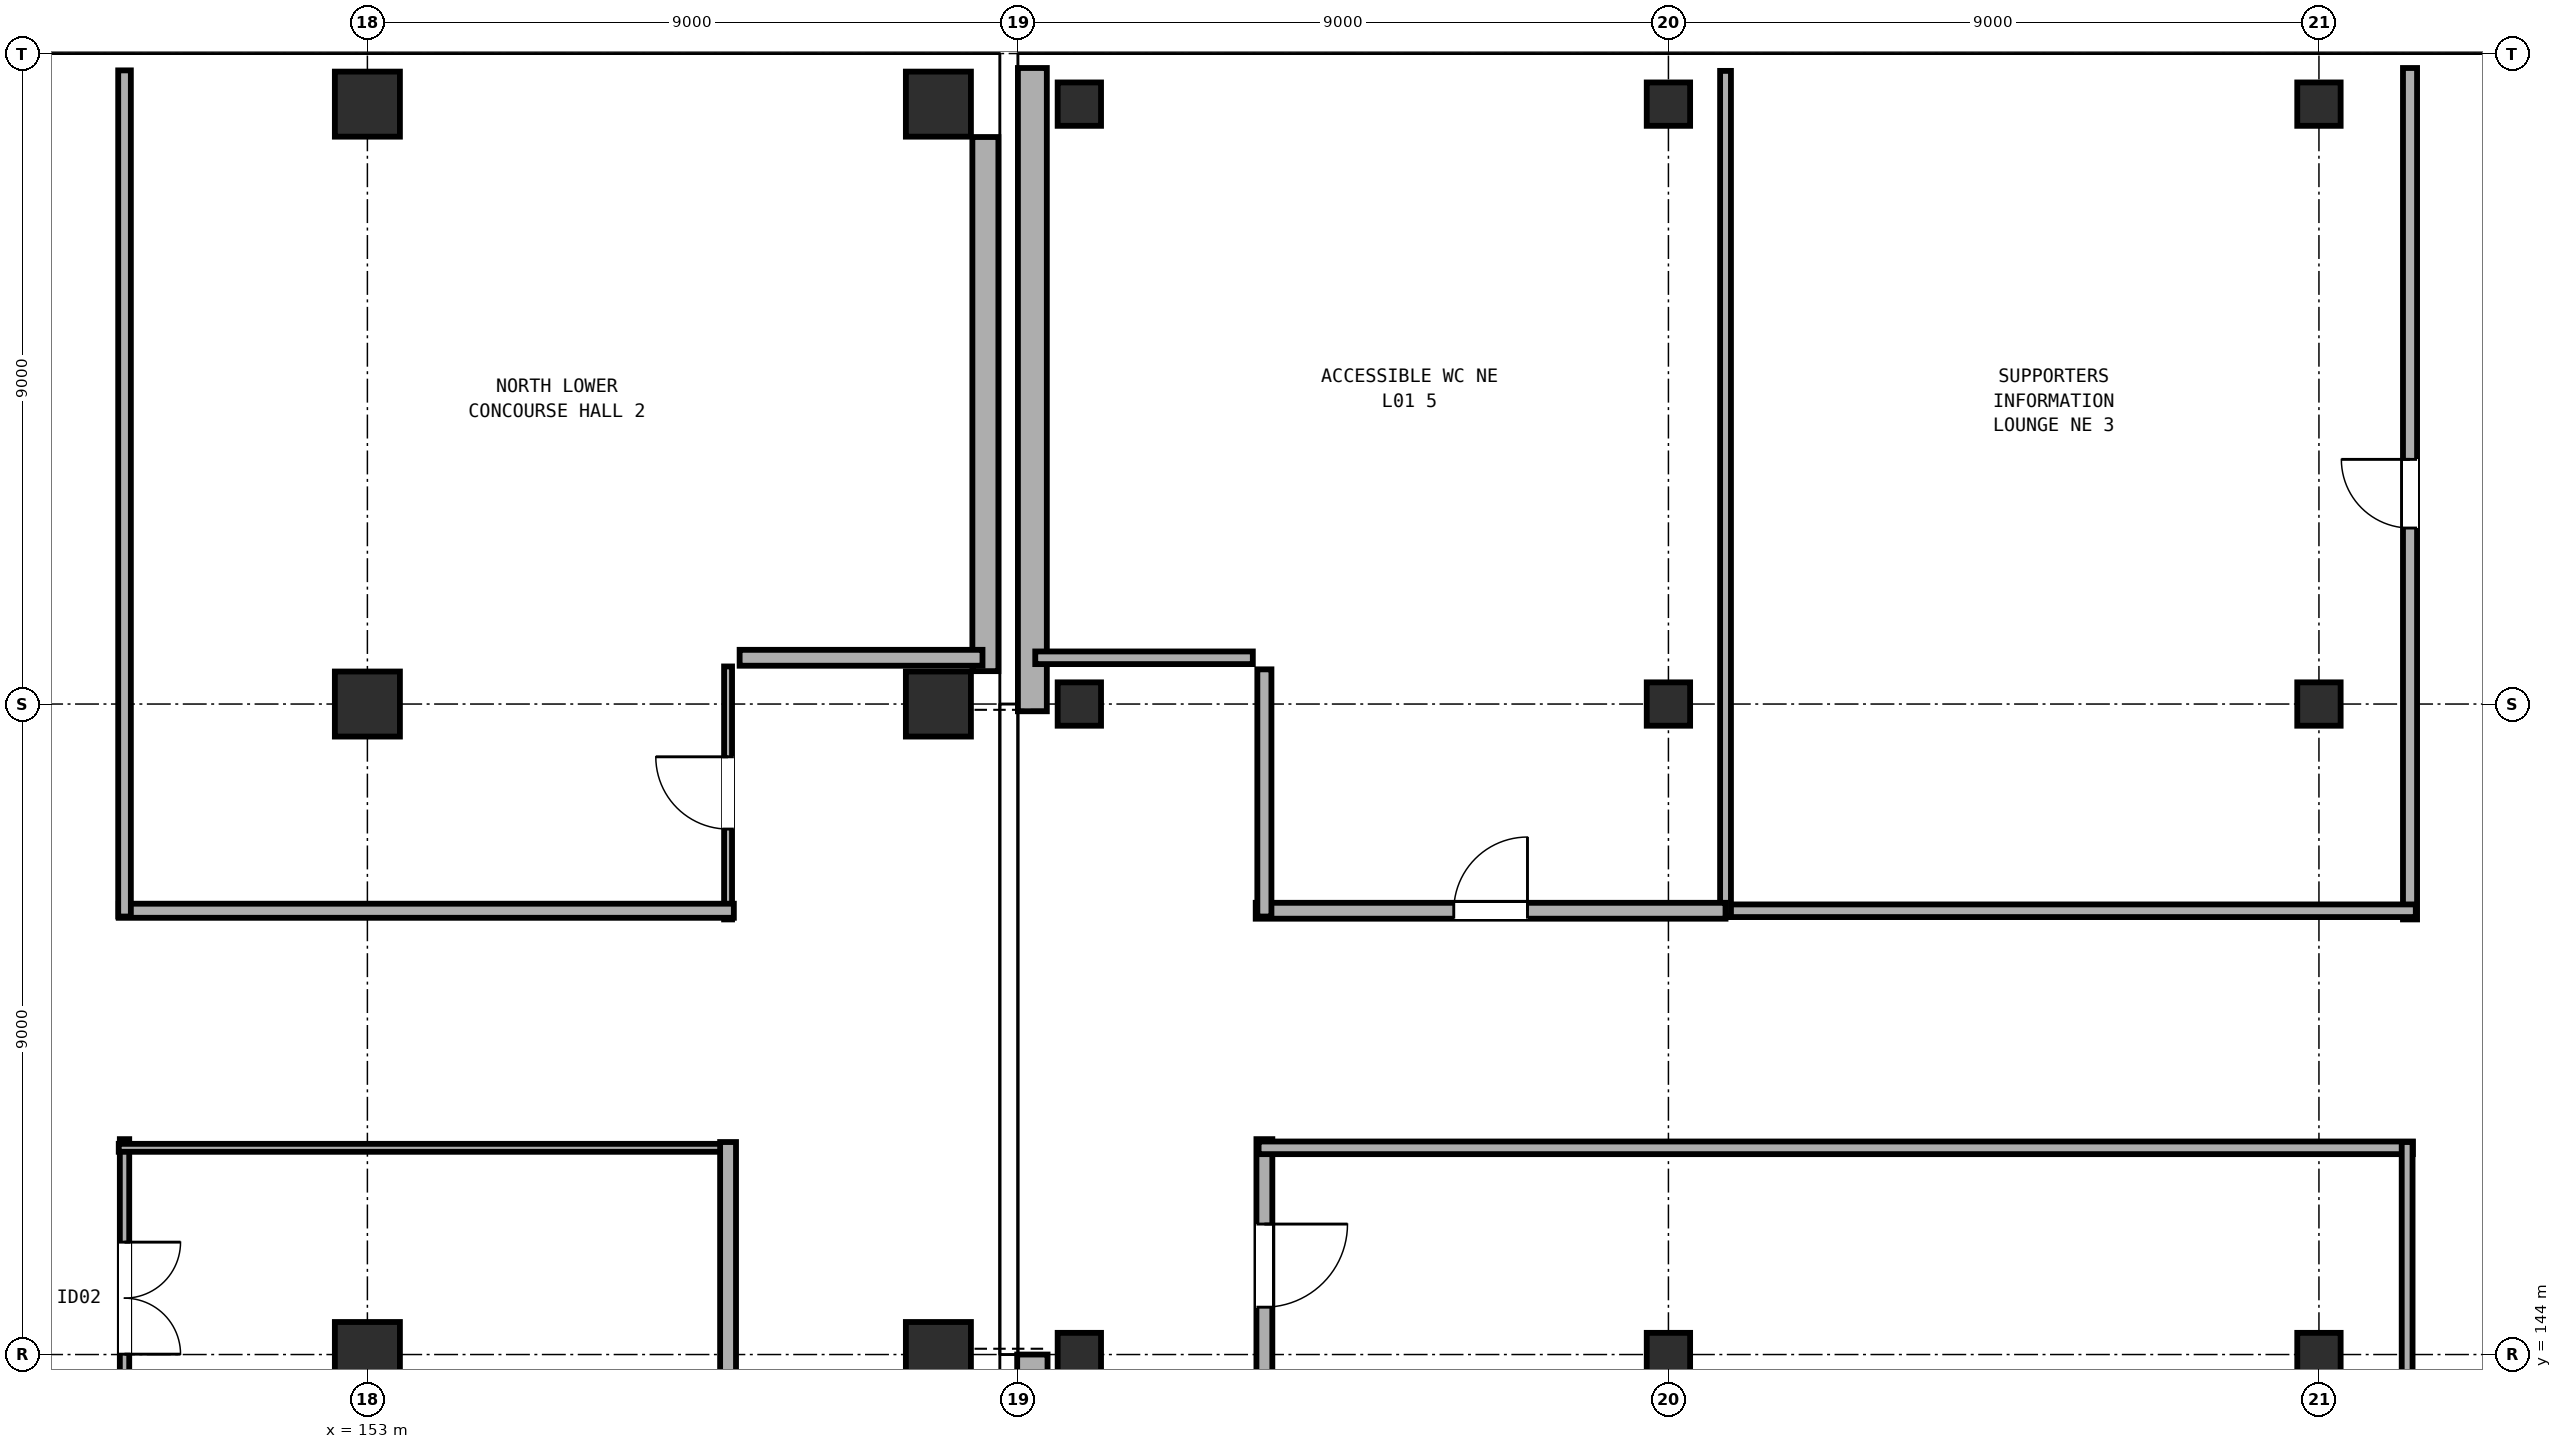
"""IFC4 building model, lengths in metres.
Left out: names, types, materials, properties, quantities, classifications, styles, units other than length and angle.
Written with IfcOpenShell. Run it as: python <this file> out.ifc"""

import sys

from ifc_helpers import new_model, si_unit, direction, frame, frame_2d, origin, origin_2d, place, context, subcontext, project, spatial, rectangle, extrude, element, fill, save


model = new_model("IFC4")
c1 = context("Model", 3, precision=1e-05, world=origin(), true_north=direction((0.0, 1.0)))
c2 = subcontext(c1, "Body", "Model", "MODEL_VIEW")
j1 = project(units=[si_unit("LENGTHUNIT", "METRE"), si_unit("PLANEANGLEUNIT", "RADIAN")], contexts=[c1])
p1 = place(None, origin())
s1 = spatial("IfcSite", under=j1, at=p1, CompositionType="ELEMENT")
p2 = place(p1, origin())
s2 = spatial("IfcBuilding", under=s1, at=p2, CompositionType="ELEMENT")
p3 = place(p2, frame((0.0, 0.0, 4.8)))
s3 = spatial("IfcBuildingStorey", under=s2, at=p3, CompositionType="ELEMENT", Elevation=4.8)
for number, where, z_axis, x_axis in (
    (1, (153.0, 144.0, 0.0), (0.0, 0.0, 1.0), (1.0, 0.0, 0.0)),
    (2, (153.0, 153.0, 0.0), (0.0, 0.0, 1.0), (1.0, 0.0, 0.0)),
    (3, (153.0, 161.3, 0.0), (0.0, 0.0, 1.0), (1.0, 0.0, 0.0)),
    (4, (160.9, 144.0, 0.0), (0.0, 0.0, 1.0), (1.0, 0.0, 0.0)),
    (5, (160.9, 153.0, 0.0), (0.0, 0.0, 1.0), (1.0, 0.0, 0.0)),
    (6, (160.9, 161.3, 0.0), (0.0, 0.0, 1.0), (1.0, 0.0, 0.0)),
):
    element("IfcColumn", number, at=place(p3, frame(where, z_axis=z_axis, x_axis=x_axis)), inside=s3, PredefinedType="COLUMN", context=c2, shape_type="SweptSolid", body=[
        extrude(rectangle(XDim=0.9, YDim=0.9, at=origin_2d()), origin(), (0.0, 0.0, 1.0), 4.8),
    ])
for number, where, z_axis, x_axis in (
    (7, (162.85, 144.0, 0.0), (0.0, 0.0, 1.0), (1.0, 0.0, 0.0)),
    (8, (162.85, 153.0, 0.0), (0.0, 0.0, 1.0), (1.0, 0.0, 0.0)),
    (9, (162.85, 161.3, 0.0), (0.0, 0.0, 1.0), (1.0, 0.0, 0.0)),
    (10, (171.0, 144.0, 0.0), (0.0, 0.0, 1.0), (1.0, 0.0, 0.0)),
    (11, (171.0, 153.0, 0.0), (0.0, 0.0, 1.0), (1.0, 0.0, 0.0)),
    (12, (171.0, 161.3, 0.0), (0.0, 0.0, 1.0), (1.0, 0.0, 0.0)),
    (13, (180.0, 144.0, 0.0), (0.0, 0.0, 1.0), (1.0, 0.0, 0.0)),
    (14, (180.0, 153.0, 0.0), (0.0, 0.0, 1.0), (1.0, 0.0, 0.0)),
    (15, (180.0, 161.3, 0.0), (0.0, 0.0, 1.0), (1.0, 0.0, 0.0)),
):
    element("IfcColumn", number, at=place(p3, frame(where, z_axis=z_axis, x_axis=x_axis)), inside=s3, PredefinedType="COLUMN", context=c2, shape_type="SweptSolid", body=[
        extrude(rectangle(XDim=0.6, YDim=0.6, at=origin_2d()), origin(), (0.0, 0.0, 1.0), 4.8),
    ])
p4 = place(p3, frame((161.55, 160.845, 0.0), z_axis=(0.0, 0.0, 1.0), x_axis=(0.0, -1.0, 0.0)))
e16 = element("IfcWall", 16, at=p4, inside=s3, PredefinedType="SOLIDWALL", context=c2, shape_type="SweptSolid", body=[
    extrude(rectangle(XDim=7.39, YDim=0.36, at=frame_2d((3.695, 0.0))), origin(), (0.0, 0.0, 1.0), 3.28),
])
p5 = place(p3, frame((162.2, 135.1, 0.0), z_axis=(0.0, 0.0, 1.0), x_axis=(0.0, 1.0, 0.0)))
e17 = element("IfcWall", 17, at=p5, inside=s3, PredefinedType="SOLIDWALL", context=c2, shape_type="SweptSolid", body=[
    extrude(rectangle(XDim=8.9, YDim=0.42, at=frame_2d((4.45, 0.0))), origin(), (0.0, 0.0, 1.0), 3.28),
])
p6 = place(p3, frame((162.2, 152.9, 0.0), z_axis=(0.0, 0.0, 1.0), x_axis=(0.0, 1.0, 0.0)))
e18 = element("IfcWall", 18, at=p6, inside=s3, PredefinedType="SOLIDWALL", context=c2, shape_type="SweptSolid", body=[
    extrude(rectangle(XDim=8.9, YDim=0.4, at=frame_2d((4.45, 0.0))), origin(), (0.0, 0.0, 1.0), 3.28),
])
p7 = place(p3, frame((163.155, 161.8, 0.0), z_axis=(0.0, 0.0, 1.0), x_axis=(1.0, 0.0, 0.0)))
e19 = element("IfcWall", 19, at=p7, inside=s3, PredefinedType="SOLIDWALL", context=c2, shape_type="SweptSolid", body=[
    extrude(rectangle(XDim=7.54, YDim=0.38, at=frame_2d((3.77, 0.0))), origin(), (0.0, 0.0, 1.0), 3.28),
])
p8 = place(p3, frame((171.305, 161.8, 0.0), z_axis=(0.0, 0.0, 1.0), x_axis=(1.0, 0.0, 0.0)))
e20 = element("IfcWall", 20, at=p8, inside=s3, PredefinedType="SOLIDWALL", context=c2, shape_type="SweptSolid", body=[
    extrude(rectangle(XDim=8.39, YDim=0.36, at=frame_2d((4.195, 0.0))), origin(), (0.0, 0.0, 1.0), 3.28),
])
p9 = place(p3, frame((180.305, 161.8, 0.0), z_axis=(0.0, 0.0, 1.0), x_axis=(1.0, 0.0, 0.0)))
e21 = element("IfcWall", 21, at=p9, inside=s3, PredefinedType="SOLIDWALL", context=c2, shape_type="SweptSolid", body=[
    extrude(rectangle(XDim=8.39, YDim=0.34, at=frame_2d((4.195, 0.0))), origin(), (0.0, 0.0, 1.0), 3.58),
])
p10 = place(p9, frame((1.552, 0.0, 0.9)))
e22 = element("IfcOpeningElement", 22, at=p10, cuts=e21, PredefinedType="OPENING", context=c2, shape_type="SweptSolid", body=[
    extrude(rectangle(XDim=2.5, YDim=2.1, at=frame_2d((1.25, 1.05))), frame((0.0, 0.18, 0.0), z_axis=(0.0, -1.0, 0.0), x_axis=(1.0, 0.0, 0.0)), (0.0, 0.0, 1.0), 0.36),
])
p11 = place(p3, frame((149.64, 146.98, 0.0), z_axis=(0.0, 0.0, 1.0), x_axis=(0.0, -1.0, 0.0)))
e23 = element("IfcWall", 23, at=p11, inside=s3, PredefinedType="PARTITIONING", context=c2, shape_type="SweptSolid", body=[
    extrude(rectangle(XDim=4.453, YDim=0.13, at=frame_2d((2.227, 0.0))), origin(), (0.0, 0.0, 1.0), 3.28),
])
p12 = place(p11, frame((1.425, 0.0, 0.0)))
e24 = element("IfcOpeningElement", 24, at=p12, cuts=e23, PredefinedType="OPENING", context=c2, shape_type="SweptSolid", body=[
    extrude(rectangle(XDim=1.55, YDim=2.2, at=frame_2d((0.775, 1.1))), frame((0.0, 0.075, 0.0), z_axis=(0.0, -1.0, 0.0), x_axis=(1.0, 0.0, 0.0)), (0.0, 0.0, 1.0), 0.15),
])
p13 = place(p3, frame((149.56, 146.86, 0.0), z_axis=(0.0, 0.0, 1.0), x_axis=(1.0, 0.0, 0.0)))
e25 = element("IfcWall", 25, at=p13, inside=s3, PredefinedType="PARTITIONING", context=c2, shape_type="SweptSolid", body=[
    extrude(rectangle(XDim=8.51, YDim=0.11, at=frame_2d((4.255, 0.0))), origin(), (0.0, 0.0, 1.0), 3.28),
])
p14 = place(p3, frame((157.99, 146.94, 0.0), z_axis=(0.0, 0.0, 1.0), x_axis=(0.0, -1.0, 0.0)))
e26 = element("IfcWall", 26, at=p14, inside=s3, PredefinedType="PARTITIONING", context=c2, shape_type="SweptSolid", body=[
    extrude(rectangle(XDim=3.42, YDim=0.22, at=frame_2d((1.71, 0.0))), origin(), (0.0, 0.0, 1.0), 3.28),
])
p15 = place(p3, frame((157.99, 150.02, 0.0), z_axis=(0.0, 0.0, 1.0), x_axis=(0.0, 1.0, 0.0)))
e27 = element("IfcWall", 27, at=p15, inside=s3, PredefinedType="PARTITIONING", context=c2, shape_type="SweptSolid", body=[
    extrude(rectangle(XDim=3.5, YDim=0.11, at=frame_2d((1.75, 0.0))), origin(), (0.0, 0.0, 1.0), 3.28),
])
p16 = place(p15, frame((1.25, 0.0, 0.0)))
e28 = element("IfcOpeningElement", 28, at=p16, cuts=e27, PredefinedType="OPENING", context=c2, shape_type="SweptSolid", body=[
    extrude(rectangle(XDim=1.0, YDim=2.1, at=frame_2d((0.5, 1.05))), frame((0.0, 0.065, 0.0), z_axis=(0.0, -1.0, 0.0), x_axis=(1.0, 0.0, 0.0)), (0.0, 0.0, 1.0), 0.13),
])
p17 = place(p3, frame((161.51, 153.64, 0.0), z_axis=(0.0, 0.0, 1.0), x_axis=(-1.0, 0.0, 0.0)))
e29 = element("IfcWall", 29, at=p17, inside=s3, PredefinedType="PARTITIONING", context=c2, shape_type="SweptSolid", body=[
    extrude(rectangle(XDim=3.36, YDim=0.22, at=frame_2d((1.68, 0.0))), origin(), (0.0, 0.0, 1.0), 3.28),
])
p18 = place(p3, frame((158.07, 150.14, 0.0), z_axis=(0.0, 0.0, 1.0), x_axis=(-1.0, 0.0, 0.0)))
e30 = element("IfcWall", 30, at=p18, inside=s3, PredefinedType="PARTITIONING", context=c2, shape_type="SweptSolid", body=[
    extrude(rectangle(XDim=8.51, YDim=0.195, at=frame_2d((4.255, 0.0))), origin(), (0.0, 0.0, 1.0), 3.28),
])
p19 = place(p3, frame((149.64, 150.06, 0.0), z_axis=(0.0, 0.0, 1.0), x_axis=(0.0, 1.0, 0.0)))
e31 = element("IfcWall", 31, at=p19, inside=s3, PredefinedType="PARTITIONING", context=c2, shape_type="SweptSolid", body=[
    extrude(rectangle(XDim=11.707, YDim=0.175, at=frame_2d((5.854, 0.0))), origin(), (0.0, 0.0, 1.0), 3.28),
])
p20 = place(p3, frame((165.41, 146.98, 0.0), z_axis=(0.0, 0.0, 1.0), x_axis=(0.0, -1.0, 0.0)))
e32 = element("IfcWall", 32, at=p20, inside=s3, PredefinedType="PARTITIONING", context=c2, shape_type="SweptSolid", body=[
    extrude(rectangle(XDim=3.5, YDim=0.22, at=frame_2d((1.75, 0.0))), origin(), (0.0, 0.0, 1.0), 3.28),
])
p21 = place(p20, frame((1.175, 0.0, 0.0)))
e33 = element("IfcOpeningElement", 33, at=p21, cuts=e32, PredefinedType="OPENING", context=c2, shape_type="SweptSolid", body=[
    extrude(rectangle(XDim=1.15, YDim=2.15, at=frame_2d((0.575, 1.075))), frame((0.0, 0.12, 0.0), z_axis=(0.0, -1.0, 0.0), x_axis=(1.0, 0.0, 0.0)), (0.0, 0.0, 1.0), 0.24),
])
p22 = place(p3, frame((165.33, 146.86, 0.0), z_axis=(0.0, 0.0, 1.0), x_axis=(1.0, 0.0, 0.0)))
e34 = element("IfcWall", 34, at=p22, inside=s3, PredefinedType="PARTITIONING", context=c2, shape_type="SweptSolid", body=[
    extrude(rectangle(XDim=15.97, YDim=0.175, at=frame_2d((7.985, 0.0))), origin(), (0.0, 0.0, 1.0), 3.28),
])
p23 = place(p3, frame((181.22, 146.94, 0.0), z_axis=(0.0, 0.0, 1.0), x_axis=(0.0, -1.0, 0.0)))
e35 = element("IfcWall", 35, at=p23, inside=s3, PredefinedType="PARTITIONING", context=c2, shape_type="SweptSolid", body=[
    extrude(rectangle(XDim=4.413, YDim=0.15, at=frame_2d((2.207, 0.0))), origin(), (0.0, 0.0, 1.0), 3.28),
])
p24 = place(p3, frame((181.26, 150.02, 0.0), z_axis=(0.0, 0.0, 1.0), x_axis=(0.0, 1.0, 0.0)))
e36 = element("IfcWall", 36, at=p24, inside=s3, PredefinedType="PARTITIONING", context=c2, shape_type="SweptSolid", body=[
    extrude(rectangle(XDim=11.78, YDim=0.195, at=frame_2d((5.89, 0.0))), origin(), (0.0, 0.0, 1.0), 3.28),
])
p25 = place(p24, frame((5.415, 0.0, 0.0)))
e37 = element("IfcOpeningElement", 37, at=p25, cuts=e36, PredefinedType="OPENING", context=c2, shape_type="SweptSolid", body=[
    extrude(rectangle(XDim=0.95, YDim=2.1, at=frame_2d((0.475, 1.05))), frame((0.0, 0.107, 0.0), z_axis=(0.0, -1.0, 0.0), x_axis=(1.0, 0.0, 0.0)), (0.0, 0.0, 1.0), 0.215),
])
p26 = place(p3, frame((181.34, 150.14, 0.0), z_axis=(0.0, 0.0, 1.0), x_axis=(-1.0, 0.0, 0.0)))
e38 = element("IfcWall", 38, at=p26, inside=s3, PredefinedType="PARTITIONING", context=c2, shape_type="SweptSolid", body=[
    extrude(rectangle(XDim=9.51, YDim=0.175, at=frame_2d((4.755, 0.0))), origin(), (0.0, 0.0, 1.0), 3.28),
])
p27 = place(p3, frame((171.79, 150.06, 0.0), z_axis=(0.0, 0.0, 1.0), x_axis=(0.0, 1.0, 0.0)))
e39 = element("IfcWall", 39, at=p27, inside=s3, PredefinedType="PARTITIONING", context=c2, shape_type="SweptSolid", body=[
    extrude(rectangle(XDim=11.7, YDim=0.15, at=frame_2d((5.85, 0.0))), origin(), (0.0, 0.0, 1.0), 3.28),
])
p28 = place(p3, frame((165.29, 150.14, 0.0), z_axis=(0.0, 0.0, 1.0), x_axis=(1.0, 0.0, 0.0)))
e40 = element("IfcWall", 40, at=p28, inside=s3, PredefinedType="PARTITIONING", context=c2, shape_type="SweptSolid", body=[
    extrude(rectangle(XDim=6.5, YDim=0.22, at=frame_2d((3.25, 0.0))), origin(), (0.0, 0.0, 1.0), 3.28),
])
p29 = place(p28, frame((2.74, 0.0, 0.0)))
e41 = element("IfcOpeningElement", 41, at=p29, cuts=e40, PredefinedType="OPENING", context=c2, shape_type="SweptSolid", body=[
    extrude(rectangle(XDim=1.02, YDim=2.16, at=frame_2d((0.51, 1.08))), frame((0.0, 0.12, 0.0), z_axis=(0.0, -1.0, 0.0), x_axis=(1.0, 0.0, 0.0)), (0.0, 0.0, 1.0), 0.24),
])
p30 = place(p3, frame((165.41, 150.06, 0.0), z_axis=(0.0, 0.0, 1.0), x_axis=(0.0, 1.0, 0.0)))
e42 = element("IfcWall", 42, at=p30, inside=s3, PredefinedType="PARTITIONING", context=c2, shape_type="SweptSolid", body=[
    extrude(rectangle(XDim=3.42, YDim=0.195, at=frame_2d((1.71, 0.0))), origin(), (0.0, 0.0, 1.0), 3.28),
])
p31 = place(p3, frame((165.25, 153.64, 0.0), z_axis=(0.0, 0.0, 1.0), x_axis=(-1.0, 0.0, 0.0)))
e43 = element("IfcWall", 43, at=p31, inside=s3, PredefinedType="PARTITIONING", context=c2, shape_type="SweptSolid", body=[
    extrude(rectangle(XDim=3.01, YDim=0.175, at=frame_2d((1.505, 0.0))), origin(), (0.0, 0.0, 1.0), 3.28),
])
p32 = place(p10, origin())
e44 = element("IfcWindow", 44, at=p32, inside=s3, PartitioningType="DOUBLE_PANEL_VERTICAL", PredefinedType="WINDOW", context=c2, shape_type="SweptSolid", body=[
    extrude(rectangle(XDim=2.5, YDim=2.1, at=frame_2d((1.25, 1.05))), frame((0.0, 0.03, 0.0), z_axis=(0.0, -1.0, 0.0), x_axis=(1.0, 0.0, 0.0)), (0.0, 0.0, 1.0), 0.06),
])
fill(e22, e44)
p33 = place(p12, origin())
e45 = element("IfcDoor", 45, at=p33, inside=s3, OperationType="DOUBLE_DOOR_SINGLE_SWING", PredefinedType="DOOR", context=c2, shape_type="SweptSolid", body=[
    extrude(rectangle(XDim=1.55, YDim=2.2, at=frame_2d((0.775, 1.1))), frame((0.0, 0.025, 0.0), z_axis=(0.0, -1.0, 0.0), x_axis=(1.0, 0.0, 0.0)), (0.0, 0.0, 1.0), 0.05),
])
fill(e24, e45)
p34 = place(p16, origin())
e46 = element("IfcDoor", 46, at=p34, inside=s3, OperationType="SINGLE_SWING_RIGHT", PredefinedType="DOOR", context=c2, shape_type="SweptSolid", body=[
    extrude(rectangle(XDim=1.0, YDim=2.1, at=frame_2d((0.5, 1.05))), frame((0.0, 0.025, 0.0), z_axis=(0.0, -1.0, 0.0), x_axis=(1.0, 0.0, 0.0)), (0.0, 0.0, 1.0), 0.05),
])
fill(e28, e46)
p35 = place(p21, origin())
e47 = element("IfcDoor", 47, at=p35, inside=s3, OperationType="SINGLE_SWING_LEFT", PredefinedType="DOOR", context=c2, shape_type="SweptSolid", body=[
    extrude(rectangle(XDim=1.15, YDim=2.15, at=frame_2d((0.575, 1.075))), frame((0.0, 0.025, 0.0), z_axis=(0.0, -1.0, 0.0), x_axis=(1.0, 0.0, 0.0)), (0.0, 0.0, 1.0), 0.05),
])
fill(e33, e47)
p36 = place(p25, origin())
e48 = element("IfcDoor", 48, at=p36, inside=s3, OperationType="SINGLE_SWING_RIGHT", PredefinedType="DOOR", context=c2, shape_type="SweptSolid", body=[
    extrude(rectangle(XDim=0.95, YDim=2.1, at=frame_2d((0.475, 1.05))), frame((0.0, 0.025, 0.0), z_axis=(0.0, -1.0, 0.0), x_axis=(1.0, 0.0, 0.0)), (0.0, 0.0, 1.0), 0.05),
])
fill(e37, e48)
p37 = place(p29, origin())
e49 = element("IfcDoor", 49, at=p37, inside=s3, OperationType="SINGLE_SWING_RIGHT", PredefinedType="DOOR", context=c2, shape_type="SweptSolid", body=[
    extrude(rectangle(XDim=1.02, YDim=2.16, at=frame_2d((0.51, 1.08))), frame((0.0, 0.025, 0.0), z_axis=(0.0, -1.0, 0.0), x_axis=(1.0, 0.0, 0.0)), (0.0, 0.0, 1.0), 0.05),
])
fill(e41, e49)
save(model, sys.argv[1])
